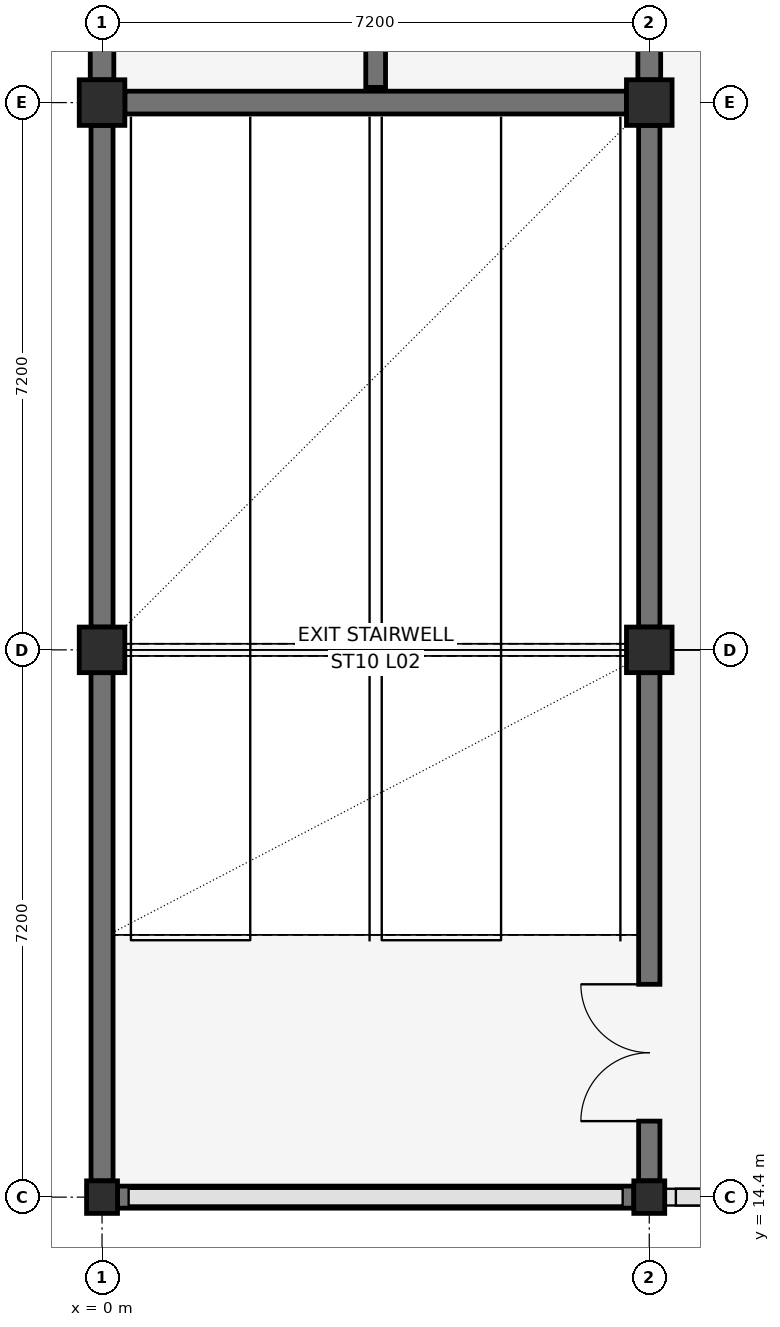
"""IFC4 building model, lengths in metres.
Left out: names, types, materials, properties, quantities, classifications, styles, units other than length and angle.
Written with IfcOpenShell. Run it as: python <this file> out.ifc"""

import sys

from ifc_helpers import new_model, si_unit, direction, frame, frame_2d, origin, origin_2d, place, context, subcontext, project, spatial, rectangle, i_section, extrude, element, fill, save


model = new_model("IFC4")
c1 = context("Model", 3, precision=1e-05, world=origin(), true_north=direction((0.0, 1.0)))
c2 = subcontext(c1, "Body", "Model", "MODEL_VIEW")
j1 = project(units=[si_unit("LENGTHUNIT", "METRE"), si_unit("PLANEANGLEUNIT", "RADIAN")], contexts=[c1])
p1 = place(None, origin())
s1 = spatial("IfcSite", under=j1, at=p1, CompositionType="ELEMENT")
p2 = place(p1, origin())
s2 = spatial("IfcBuilding", under=s1, at=p2, CompositionType="ELEMENT")
p3 = place(p2, frame((0.0, 0.0, 10.2)))
s3 = spatial("IfcBuildingStorey", under=s2, at=p3, CompositionType="ELEMENT", Elevation=10.2)
p4 = place(p3, frame((0.0, 14.4, 0.0), z_axis=(0.0, 0.0, 1.0), x_axis=(1.0, 0.0, 0.0)))
e1 = element("IfcColumn", 1, at=p4, inside=s3, PredefinedType="COLUMN", context=c2, shape_type="SweptSolid", body=[
    extrude(i_section(OverallWidth=0.407, OverallDepth=0.428, WebThickness=0.02, FlangeThickness=0.035, FilletRadius=0.022, at=origin_2d()), origin(), (0.0, 0.0, 1.0), 4.8),
])
for number, where, z_axis, x_axis in (
    (2, (0.0, 21.6, 0.0), (0.0, 0.0, 1.0), (1.0, 0.0, 0.0)),
    (3, (0.0, 28.8, 0.0), (0.0, 0.0, 1.0), (1.0, 0.0, 0.0)),
):
    element("IfcColumn", number, at=place(p3, frame(where, z_axis=z_axis, x_axis=x_axis)), inside=s3, PredefinedType="COLUMN", context=c2, shape_type="SweptSolid", body=[
        extrude(rectangle(XDim=0.6, YDim=0.6, at=origin_2d()), origin(), (0.0, 0.0, 1.0), 4.8),
    ])
p5 = place(p3, frame((7.2, 14.4, 0.0), z_axis=(0.0, 0.0, 1.0), x_axis=(1.0, 0.0, 0.0)))
e4 = element("IfcColumn", 4, at=p5, inside=s3, PredefinedType="COLUMN", context=c2, shape_type="SweptSolid", body=[
    extrude(i_section(OverallWidth=0.407, OverallDepth=0.428, WebThickness=0.02, FlangeThickness=0.035, FilletRadius=0.022, at=origin_2d()), origin(), (0.0, 0.0, 1.0), 11.825),
])
for number, where, z_axis, x_axis in (
    (5, (7.2, 21.6, 0.0), (0.0, 0.0, 1.0), (1.0, 0.0, 0.0)),
    (6, (7.2, 28.8, 0.0), (0.0, 0.0, 1.0), (1.0, 0.0, 0.0)),
):
    element("IfcColumn", number, at=place(p3, frame(where, z_axis=z_axis, x_axis=x_axis)), inside=s3, PredefinedType="COLUMN", context=c2, shape_type="SweptSolid", body=[
        extrude(rectangle(XDim=0.6, YDim=0.6, at=origin_2d()), origin(), (0.0, 0.0, 1.0), 4.8),
    ])
p6 = place(p3, frame((0.3, 28.8, 0.0), z_axis=(0.0, 0.0, 1.0), x_axis=(1.0, 0.0, 0.0)))
e7 = element("IfcWall", 7, at=p6, inside=s3, PredefinedType="SHEAR", context=c2, shape_type="SweptSolid", body=[
    extrude(rectangle(XDim=6.6, YDim=0.3, at=frame_2d((3.3, 0.0))), origin(), (0.0, 0.0, 1.0), 4.56),
])
p7 = place(p3, frame((0.0, 29.1, 0.0), z_axis=(0.0, 0.0, 1.0), x_axis=(0.0, 1.0, 0.0)))
e8 = element("IfcWall", 8, at=p7, inside=s3, PredefinedType="SHEAR", context=c2, shape_type="SweptSolid", body=[
    extrude(rectangle(XDim=6.6, YDim=0.31, at=frame_2d((3.3, 0.0))), origin(), (0.0, 0.0, 1.0), 4.56),
])
p8 = place(p3, frame((7.2, 29.1, 0.0), z_axis=(0.0, 0.0, 1.0), x_axis=(0.0, 1.0, 0.0)))
e9 = element("IfcWall", 9, at=p8, inside=s3, PredefinedType="SHEAR", context=c2, shape_type="SweptSolid", body=[
    extrude(rectangle(XDim=6.6, YDim=0.3, at=frame_2d((3.3, 0.0))), origin(), (0.0, 0.0, 1.0), 4.56),
])
p9 = place(p3, frame((3.6, 29.0, 0.0), z_axis=(0.0, 0.0, 1.0), x_axis=(0.0, 1.0, 0.0)))
e10 = element("IfcWall", 10, at=p9, inside=s3, PredefinedType="SHEAR", context=c2, shape_type="SweptSolid", body=[
    extrude(rectangle(XDim=14.0, YDim=0.26, at=frame_2d((7.0, 0.0))), origin(), (0.0, 0.0, 1.0), 4.56),
])
p10 = place(p9, frame((1.65, 0.0, 0.0)))
e11 = element("IfcOpeningElement", 11, at=p10, cuts=e10, PredefinedType="OPENING", context=c2, shape_type="SweptSolid", body=[
    extrude(rectangle(XDim=1.1, YDim=2.15, at=frame_2d((0.55, 1.075))), frame((0.0, 0.145, 0.0), z_axis=(0.0, -1.0, 0.0), x_axis=(1.0, 0.0, 0.0)), (0.0, 0.0, 1.0), 0.29),
])
p11 = place(p9, frame((10.6, 0.0, 0.0)))
e12 = element("IfcOpeningElement", 12, at=p11, cuts=e10, PredefinedType="OPENING", context=c2, shape_type="SweptSolid", body=[
    extrude(rectangle(XDim=1.1, YDim=2.2, at=frame_2d((0.55, 1.1))), frame((0.0, 0.145, 0.0), z_axis=(0.0, -1.0, 0.0), x_axis=(1.0, 0.0, 0.0)), (0.0, 0.0, 1.0), 0.29),
])
p12 = place(p3, frame((0.204, 14.4, 0.0), z_axis=(0.0, 0.0, 1.0), x_axis=(1.0, 0.0, 0.0)))
e13 = element("IfcWall", 13, at=p12, inside=s3, PredefinedType="SHEAR", context=c2, shape_type="SweptSolid", body=[
    extrude(rectangle(XDim=6.793, YDim=0.29, at=frame_2d((3.396, 0.0))), origin(), (0.0, 0.0, 1.0), 4.56),
])
p13 = place(p3, frame((0.0, 14.614, 0.0), z_axis=(0.0, 0.0, 1.0), x_axis=(0.0, 1.0, 0.0)))
e14 = element("IfcWall", 14, at=p13, inside=s3, PredefinedType="SHEAR", context=c2, shape_type="SweptSolid", body=[
    extrude(rectangle(XDim=6.686, YDim=0.29, at=frame_2d((3.343, 0.0))), origin(), (0.0, 0.0, 1.0), 4.56),
])
p14 = place(p3, frame((0.0, 21.9, 0.0), z_axis=(0.0, 0.0, 1.0), x_axis=(0.0, 1.0, 0.0)))
e15 = element("IfcWall", 15, at=p14, inside=s3, PredefinedType="SHEAR", context=c2, shape_type="SweptSolid", body=[
    extrude(rectangle(XDim=6.6, YDim=0.29, at=frame_2d((3.3, 0.0))), origin(), (0.0, 0.0, 1.0), 4.56),
])
p15 = place(p3, frame((7.2, 14.614, 0.0), z_axis=(0.0, 0.0, 1.0), x_axis=(0.0, 1.0, 0.0)))
e16 = element("IfcWall", 16, at=p15, inside=s3, PredefinedType="SHEAR", context=c2, shape_type="SweptSolid", body=[
    extrude(rectangle(XDim=6.686, YDim=0.28, at=frame_2d((3.343, 0.0))), origin(), (0.0, 0.0, 1.0), 4.56),
])
p16 = place(p15, frame((0.786, 0.0, 0.0)))
e17 = element("IfcOpeningElement", 17, at=p16, cuts=e16, PredefinedType="OPENING", context=c2, shape_type="SweptSolid", body=[
    extrude(rectangle(XDim=1.8, YDim=2.2, at=frame_2d((0.9, 1.1))), frame((0.0, 0.155, 0.0), z_axis=(0.0, -1.0, 0.0), x_axis=(1.0, 0.0, 0.0)), (0.0, 0.0, 1.0), 0.31),
])
p17 = place(p3, frame((7.2, 21.9, 0.0), z_axis=(0.0, 0.0, 1.0), x_axis=(0.0, 1.0, 0.0)))
e18 = element("IfcWall", 18, at=p17, inside=s3, PredefinedType="SHEAR", context=c2, shape_type="SweptSolid", body=[
    extrude(rectangle(XDim=6.6, YDim=0.28, at=frame_2d((3.3, 0.0))), origin(), (0.0, 0.0, 1.0), 4.56),
])
p18 = place(p16, origin())
e19 = element("IfcDoor", 19, at=p18, inside=s3, OperationType="DOUBLE_SWING_LEFT", PredefinedType="DOOR", context=c2, shape_type="SweptSolid", body=[
    extrude(rectangle(XDim=1.8, YDim=2.2, at=frame_2d((0.9, 1.1))), frame((0.0, 0.025, 0.0), z_axis=(0.0, -1.0, 0.0), x_axis=(1.0, 0.0, 0.0)), (0.0, 0.0, 1.0), 0.05),
])
fill(e17, e19)
save(model, sys.argv[1])
